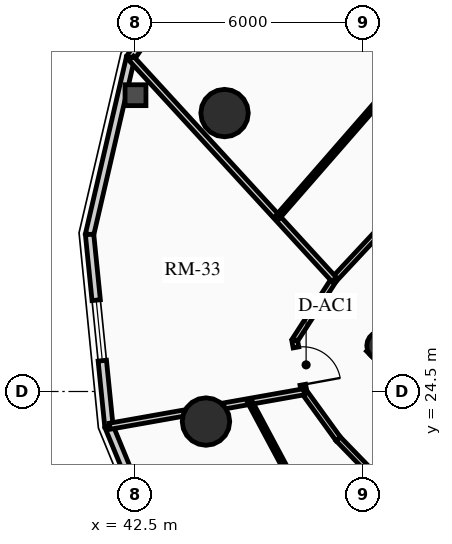
"""IFC4 building model, lengths in metres.
Left out: names, types, materials, properties, quantities, classifications, styles, units other than length and angle.
Written with IfcOpenShell. Run it as: python <this file> out.ifc"""

import sys

from ifc_helpers import new_model, si_unit, direction, frame, frame_2d, origin, origin_2d, place, context, subcontext, project, spatial, rectangle, circle, hollow_circle, extrude, source, transform, mapped, element, fill, save


model = new_model("IFC4")
c1 = context("Model", 3, precision=1e-05, world=origin(), true_north=direction((0.0, 1.0)))
c2 = subcontext(c1, "Body", "Model", "MODEL_VIEW")
j1 = project(units=[si_unit("LENGTHUNIT", "METRE"), si_unit("PLANEANGLEUNIT", "RADIAN")], contexts=[c1])
p1 = place(None, origin())
s1 = spatial("IfcSite", under=j1, at=p1, CompositionType="ELEMENT")
p2 = place(p1, origin())
s2 = spatial("IfcBuilding", under=s1, at=p2, CompositionType="ELEMENT")
p3 = place(p2, frame((0.0, 0.0, 166.15)))
s3 = spatial("IfcBuildingStorey", under=s2, at=p3, CompositionType="ELEMENT", Elevation=166.15)
p4 = place(p3, frame((58.702, 15.732, 0.0), z_axis=(0.0, 0.0, 1.0), x_axis=(-0.707106781187, 0.707106781187, 0.0)))
e1 = element("IfcWall", 1, at=p4, inside=s3, PredefinedType="SHEAR", context=c2, shape_type="SweptSolid", body=[
    extrude(rectangle(XDim=14.1, YDim=0.4, at=frame_2d((7.05, 0.0))), origin(), (0.0, 0.0, 1.0), 2.91),
])
p5 = place(p3, frame((48.873, 25.561, 0.0), z_axis=(0.0, 0.0, 1.0), x_axis=(0.707106781187, 0.707106781187, 0.0)))
e2 = element("IfcWall", 2, at=p5, inside=s3, PredefinedType="SHEAR", context=c2, shape_type="SweptSolid", body=[
    extrude(rectangle(XDim=10.7, YDim=0.4, at=frame_2d((5.35, 0.0))), origin(), (0.0, 0.0, 1.0), 2.91),
])
m1 = source(origin(), c2, "Body", "SweptSolid", [
    extrude(rectangle(XDim=1.5, YDim=2.02, at=frame_2d((0.75, 1.01))), frame((0.0, 0.21, 0.0), z_axis=(0.0, -1.0, 0.0), x_axis=(1.0, 0.0, 0.0)), (0.0, 0.0, 1.0), 0.42),
])
p6 = place(p5, frame((4.6, 0.0, 0.0)))
e3 = element("IfcOpeningElement", 3, at=p6, cuts=e2, PredefinedType="OPENING", context=c2, shape_type="MappedRepresentation", body=[
    mapped(m1, transform((0.0, 0.0, 0.0), x_axis=(1.0, 0.0, 0.0), y_axis=(0.0, 1.0, 0.0), z_axis=(0.0, 0.0, 1.0), scale=1.0)),
])
p7 = place(p3, frame((48.976, 25.706, 0.0), z_axis=(0.0, 0.0, 1.0), x_axis=(0.707106781187, 0.707106781187, 0.0)))
e4 = element("IfcColumn", 4, at=p7, inside=s3, PredefinedType="COLUMN", context=c2, shape_type="SweptSolid", body=[
    extrude(hollow_circle(Radius=0.38, WallThickness=0.032, at=origin_2d()), origin(), (0.0, 0.0, 1.0), 2.91),
])
for number, where, z_axis, x_axis in (
    (5, (44.854, 31.827, 0.0), (0.0, 0.0, 1.0), (1.0, 0.0, 0.0)),
    (6, (44.365, 23.709, 0.0), (0.0, 0.0, 1.0), (1.0, 0.0, 0.0)),
):
    element("IfcColumn", number, at=place(p3, frame(where, z_axis=z_axis, x_axis=x_axis)), inside=s3, PredefinedType="USERDEFINED", context=c2, shape_type="SweptSolid", body=[
        extrude(circle(Radius=0.625, at=origin_2d()), origin(), (0.0, 0.0, 1.0), 2.91),
    ])
p8 = place(p3, frame((42.378, 33.279, 0.0), z_axis=(0.0, 0.0, 1.0), x_axis=(0.559635286042, 0.828739009952, 0.0)))
e7 = element("IfcWall", 7, at=p8, inside=s3, PredefinedType="SOLIDWALL", context=c2, shape_type="SweptSolid", body=[
    extrude(rectangle(XDim=4.569, YDim=0.22, at=frame_2d((2.284, 0.0))), origin(), (0.0, 0.0, 1.0), 2.675),
])
m2 = source(origin(), c2, "Body", "SweptSolid", [
    extrude(rectangle(XDim=1.6, YDim=1.3, at=frame_2d((0.8, 0.65))), frame((0.0, 0.12, 0.0), z_axis=(0.0, -1.0, 0.0), x_axis=(1.0, 0.0, 0.0)), (0.0, 0.0, 1.0), 0.24),
])
p9 = place(p8, frame((1.484, 0.0, 0.65)))
e8 = element("IfcOpeningElement", 8, at=p9, cuts=e7, PredefinedType="OPENING", context=c2, shape_type="MappedRepresentation", body=[
    mapped(m2, transform((0.0, 0.0, 0.0), x_axis=(1.0, 0.0, 0.0), y_axis=(0.0, 1.0, 0.0), z_axis=(0.0, 0.0, 1.0), scale=1.0)),
])
p10 = place(p3, frame((41.302, 28.633, 0.0), z_axis=(0.0, 0.0, 1.0), x_axis=(0.225659540039, 0.974206226622, 0.0)))
e9 = element("IfcWall", 9, at=p10, inside=s3, PredefinedType="SOLIDWALL", context=c2, shape_type="SweptSolid", body=[
    extrude(rectangle(XDim=4.769, YDim=0.22, at=frame_2d((2.385, 0.0))), origin(), (0.0, 0.0, 1.0), 2.675),
])
p11 = place(p3, frame((41.811, 23.582, 0.0), z_axis=(0.0, 0.0, 1.0), x_axis=(-0.100279889424, 0.994959267396, 0.0)))
e10 = element("IfcWall", 10, at=p11, inside=s3, PredefinedType="SOLIDWALL", context=c2, shape_type="SweptSolid", body=[
    extrude(rectangle(XDim=5.076, YDim=0.22, at=frame_2d((2.538, 0.0))), origin(), (0.0, 0.0, 1.0), 2.675),
])
p12 = place(p11, frame((1.738, 0.0, 0.65)))
e11 = element("IfcOpeningElement", 11, at=p12, cuts=e10, PredefinedType="OPENING", context=c2, shape_type="MappedRepresentation", body=[
    mapped(m2, transform((0.0, 0.0, 0.0), x_axis=(1.0, 0.0, 0.0), y_axis=(0.0, 1.0, 0.0), z_axis=(0.0, 0.0, 1.0), scale=1.0)),
])
p13 = place(p3, frame((43.856, 18.622, 0.0), z_axis=(0.0, 0.0, 1.0), x_axis=(-0.38111364655, 0.924528197738, 0.0)))
e12 = element("IfcWall", 12, at=p13, inside=s3, PredefinedType="SOLIDWALL", context=c2, shape_type="SweptSolid", body=[
    extrude(rectangle(XDim=5.366, YDim=0.22, at=frame_2d((2.683, 0.0))), origin(), (0.0, 0.0, 1.0), 2.675),
])
p14 = place(p13, frame((1.883, 0.0, 0.65)))
e13 = element("IfcOpeningElement", 13, at=p14, cuts=e12, PredefinedType="OPENING", context=c2, shape_type="MappedRepresentation", body=[
    mapped(m2, transform((0.0, 0.0, 0.0), x_axis=(1.0, 0.0, 0.0), y_axis=(0.0, 1.0, 0.0), z_axis=(0.0, 0.0, 1.0), scale=1.0)),
])
p15 = place(p3, frame((52.135, 32.159, 0.0), z_axis=(0.0, 0.0, 1.0), x_axis=(-0.682546302454, -0.730842353047, 0.0)))
e14 = element("IfcWall", 14, at=p15, inside=s3, PredefinedType="PARTITIONING", context=c2, shape_type="SweptSolid", body=[
    extrude(rectangle(XDim=6.445, YDim=0.15, at=frame_2d((3.223, 0.0))), origin(), (0.0, 0.0, 1.0), 2.245),
])
p16 = place(p3, frame((47.736, 27.449, 0.0), z_axis=(0.0, 0.0, 1.0), x_axis=(-0.542589259408, -0.839998152126, 0.0)))
e15 = element("IfcWall", 15, at=p16, inside=s3, PredefinedType="PARTITIONING", context=c2, shape_type="SweptSolid", body=[
    extrude(rectangle(XDim=1.912, YDim=0.15, at=frame_2d((0.956, 0.0))), origin(), (0.0, 0.0, 1.0), 2.245),
])
p17 = place(p3, frame((46.699, 25.843, 0.0), z_axis=(0.0, 0.0, 1.0), x_axis=(0.180451258011, -0.983583928032, 0.0)))
e16 = element("IfcWall", 16, at=p17, inside=s3, PredefinedType="PARTITIONING", context=c2, shape_type="SweptSolid", body=[
    extrude(rectangle(XDim=1.372, YDim=0.15, at=frame_2d((0.686, 0.0))), origin(), (0.0, 0.0, 1.0), 2.245),
])
m3 = source(origin(), c2, "Body", "SweptSolid", [
    extrude(rectangle(XDim=1.0, YDim=2.015, at=frame_2d((0.5, 1.007))), frame((0.0, 0.085, 0.0), z_axis=(0.0, -1.0, 0.0), x_axis=(1.0, 0.0, 0.0)), (0.0, 0.0, 1.0), 0.17),
])
p18 = place(p17, frame((0.186, 0.0, 0.0)))
e17 = element("IfcOpeningElement", 17, at=p18, cuts=e16, PredefinedType="OPENING", context=c2, shape_type="MappedRepresentation", body=[
    mapped(m3, transform((0.0, 0.0, 0.0), x_axis=(1.0, 0.0, 0.0), y_axis=(0.0, 1.0, 0.0), z_axis=(0.0, 0.0, 1.0), scale=1.0)),
])
p19 = place(p3, frame((46.946, 24.494, 0.0), z_axis=(0.0, 0.0, 1.0), x_axis=(0.586340262528, -0.810064871809, 0.0)))
e18 = element("IfcWall", 18, at=p19, inside=s3, PredefinedType="PARTITIONING", context=c2, shape_type="SweptSolid", body=[
    extrude(rectangle(XDim=1.531, YDim=0.15, at=frame_2d((0.766, 0.0))), origin(), (0.0, 0.0, 1.0), 2.245),
])
p20 = place(p3, frame((47.844, 23.253, 0.0), z_axis=(0.0, 0.0, 1.0), x_axis=(0.696248411352, -0.717800912293, 0.0)))
e19 = element("IfcWall", 19, at=p20, inside=s3, PredefinedType="PARTITIONING", context=c2, shape_type="SweptSolid", body=[
    extrude(rectangle(XDim=5.947, YDim=0.15, at=frame_2d((2.974, 0.0))), origin(), (0.0, 0.0, 1.0), 2.675),
])
p21 = place(p3, frame((47.736, 27.449, 0.0), z_axis=(0.0, 0.0, 1.0), x_axis=(-0.676056254668, 0.736850012231, 0.0)))
e20 = element("IfcWall", 20, at=p21, inside=s3, PredefinedType="PARTITIONING", context=c2, shape_type="SweptSolid", body=[
    extrude(rectangle(XDim=7.899, YDim=0.16, at=frame_2d((3.95, 0.0))), origin(), (0.0, 0.0, 1.0), 2.245),
])
p22 = place(p3, frame((46.946, 24.494, 0.0), z_axis=(0.0, 0.0, 1.0), x_axis=(-0.984604227647, -0.174798497988, 0.0)))
e21 = element("IfcWall", 21, at=p22, inside=s3, PredefinedType="PARTITIONING", context=c2, shape_type="SweptSolid", body=[
    extrude(rectangle(XDim=5.196, YDim=0.16, at=frame_2d((2.598, 0.0))), origin(), (0.0, 0.0, 1.0), 2.245),
])
p23 = place(p3, frame((50.123, 33.529, 0.0), z_axis=(0.0, 0.0, 1.0), x_axis=(-0.657371249324, -0.753566878626, 0.0)))
e22 = element("IfcWall", 22, at=p23, inside=s3, PredefinedType="PARTITIONING", context=c2, shape_type="SweptSolid", body=[
    extrude(rectangle(XDim=5.906, YDim=0.125, at=frame_2d((2.953, 0.0))), origin(), (0.0, 0.0, 1.0), 2.245),
])
p24 = place(p3, frame((45.514, 24.239, 0.0), z_axis=(0.0, 0.0, 1.0), x_axis=(0.471225296528, -0.882012879674, 0.0)))
e23 = element("IfcWall", 23, at=p24, inside=s3, PredefinedType="PARTITIONING", context=c2, shape_type="SweptSolid", body=[
    extrude(rectangle(XDim=2.585, YDim=0.125, at=frame_2d((1.292, 0.0))), origin(), (0.0, 0.0, 1.0), 2.245),
])
m4 = source(origin(), c2, "Body", "SweptSolid", [
    extrude(rectangle(XDim=1.6, YDim=1.3, at=frame_2d((0.8, 0.65))), frame((0.0, 0.03, 0.0), z_axis=(0.0, -1.0, 0.0), x_axis=(1.0, 0.0, 0.0)), (0.0, 0.0, 1.0), 0.06),
])
p25 = place(p12, origin())
e24 = element("IfcWindow", 24, at=p25, inside=s3, PartitioningType="SINGLE_PANEL", PredefinedType="WINDOW", context=c2, shape_type="MappedRepresentation", body=[
    mapped(m4, transform((0.0, 0.0, 0.0), x_axis=(1.0, 0.0, 0.0), y_axis=(0.0, 1.0, 0.0), z_axis=(0.0, 0.0, 1.0), scale=1.0)),
])
fill(e11, e24)
m5 = source(origin(), c2, "Body", "SweptSolid", [
    extrude(rectangle(XDim=1.0, YDim=2.015, at=frame_2d((0.5, 1.007))), frame((0.0, 0.025, 0.0), z_axis=(0.0, -1.0, 0.0), x_axis=(1.0, 0.0, 0.0)), (0.0, 0.0, 1.0), 0.05),
])
p26 = place(p18, origin())
e25 = element("IfcDoor", 25, at=p26, inside=s3, OperationType="SINGLE_SWING_RIGHT", PredefinedType="DOOR", context=c2, shape_type="MappedRepresentation", body=[
    mapped(m5, transform((0.0, 0.0, 0.0), x_axis=(1.0, 0.0, 0.0), y_axis=(0.0, 1.0, 0.0), z_axis=(0.0, 0.0, 1.0), scale=1.0)),
])
fill(e17, e25)
save(model, sys.argv[1])
